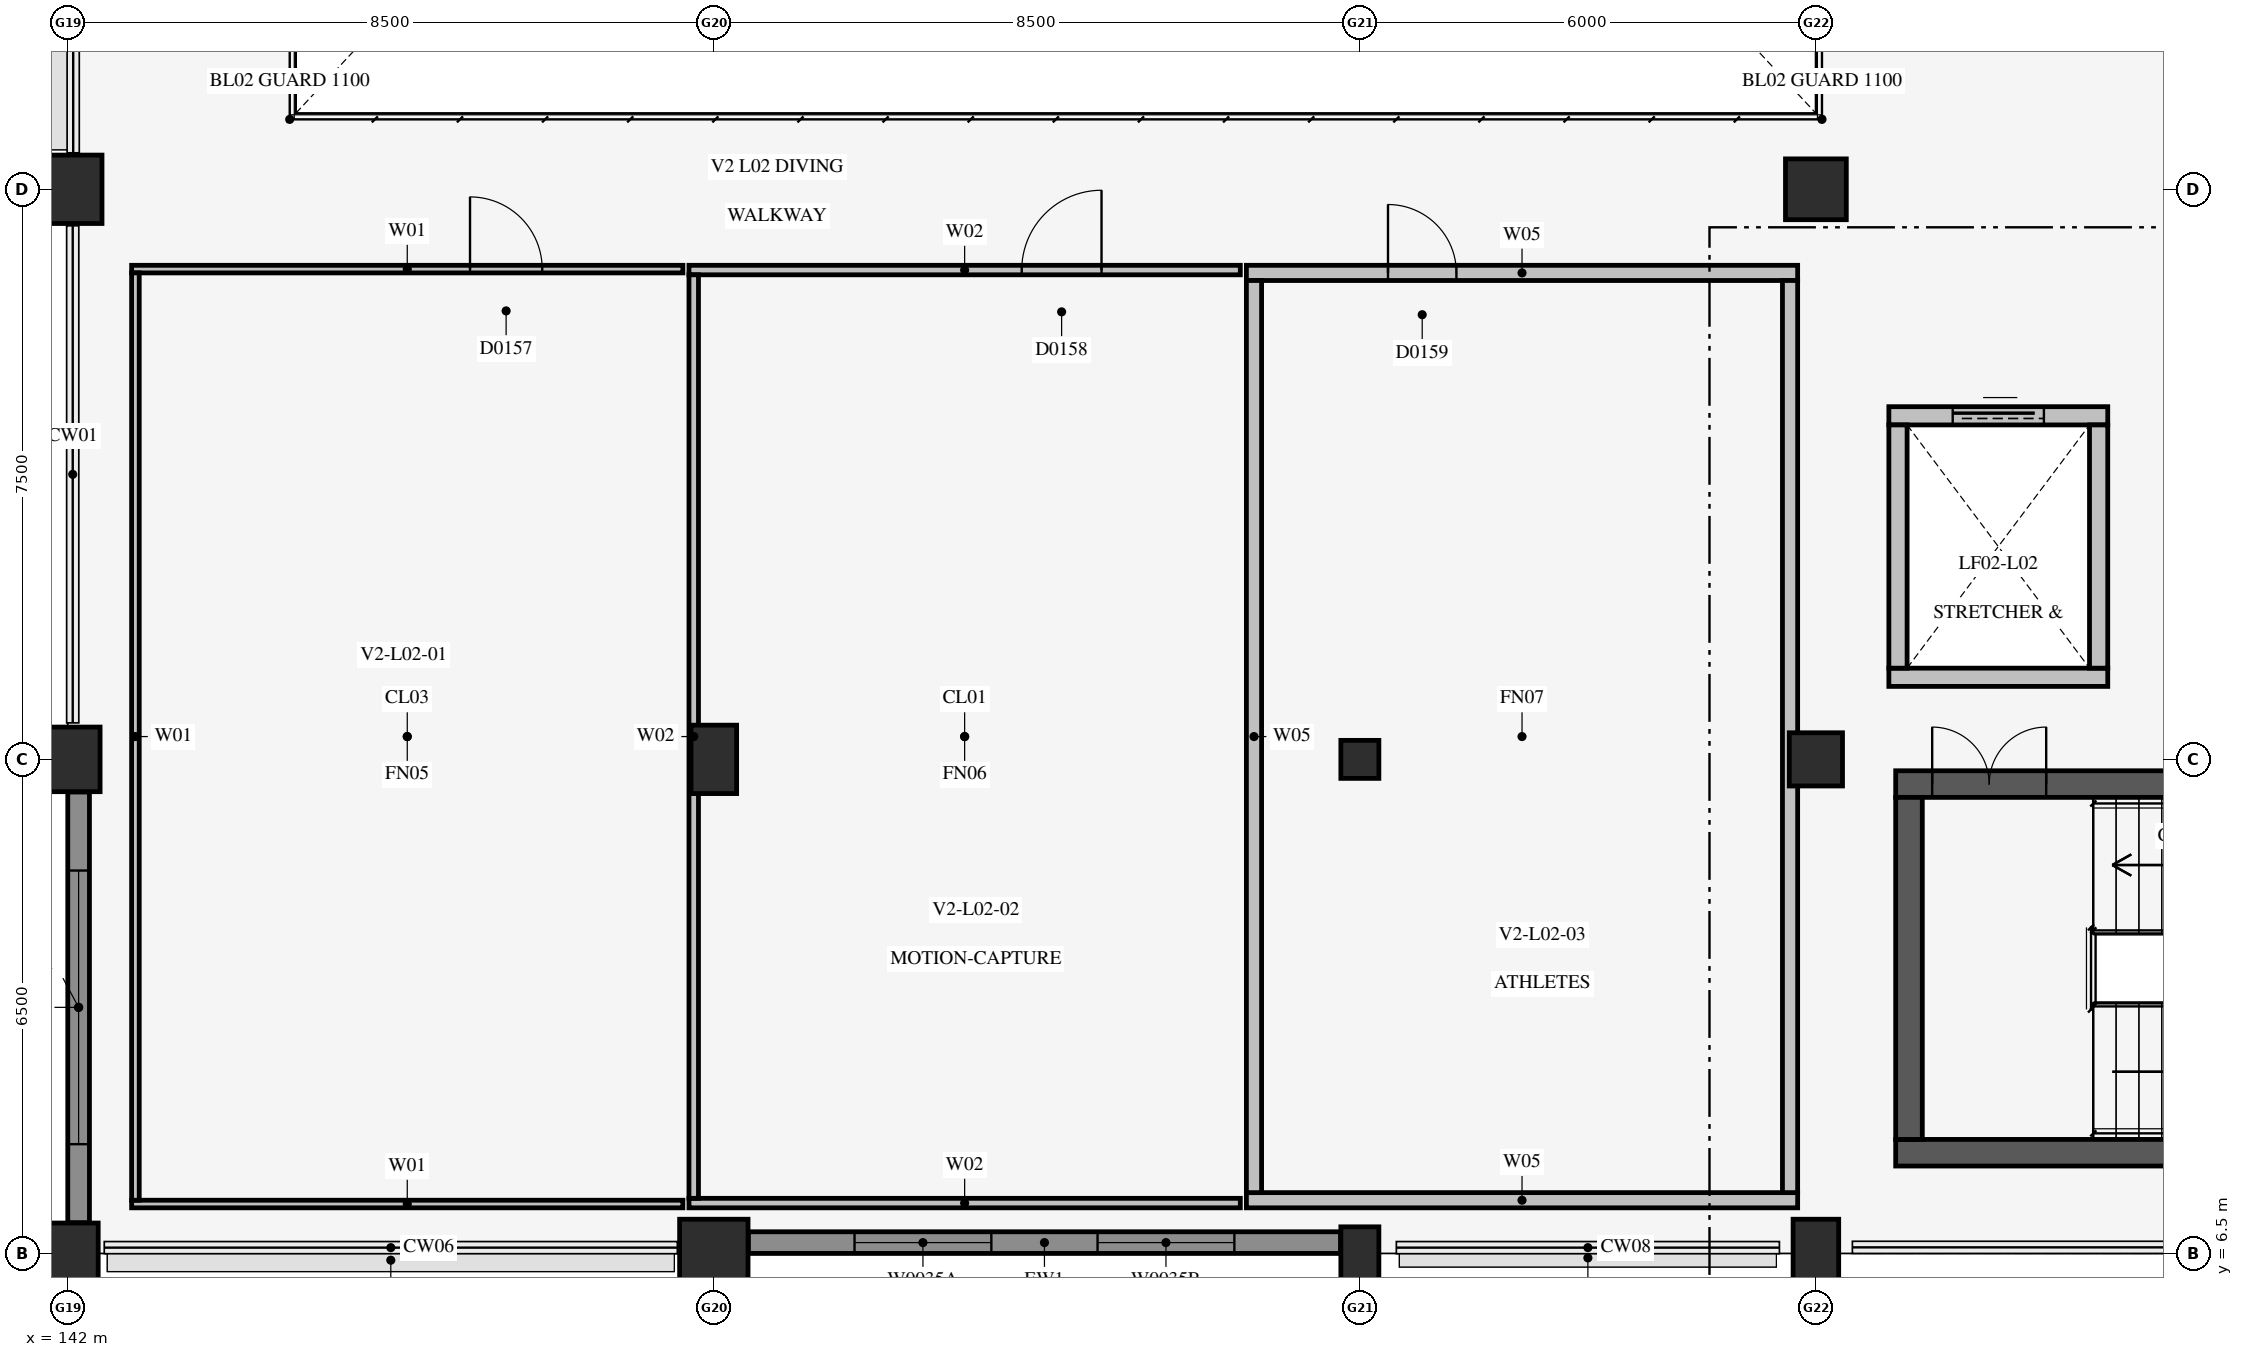
"""IFC4 building model, lengths in metres.
Left out: names, types, materials, properties, quantities, classifications, styles, units other than length and angle.
Written with IfcOpenShell. Run it as: python <this file> out.ifc"""

import sys

from ifc_helpers import new_model, si_unit, direction, frame, frame_2d, origin, origin_2d, place, context, subcontext, project, spatial, rectangle, circle, extrude, element, fill, save


model = new_model("IFC4")
c1 = context("Model", 3, precision=1e-05, world=origin(), true_north=direction((0.0, 1.0)))
c2 = subcontext(c1, "Body", "Model", "MODEL_VIEW")
j1 = project(units=[si_unit("LENGTHUNIT", "METRE"), si_unit("PLANEANGLEUNIT", "RADIAN")], contexts=[c1])
p1 = place(None, origin())
s1 = spatial("IfcSite", under=j1, at=p1, CompositionType="ELEMENT")
p2 = place(p1, origin())
s2 = spatial("IfcBuilding", under=s1, at=p2, CompositionType="ELEMENT")
p3 = place(p2, frame((0.0, 0.0, 10.2)))
s3 = spatial("IfcBuildingStorey", under=s2, at=p3, CompositionType="ELEMENT", Elevation=10.2)
p4 = place(p3, frame((166.05, 7.825, 0.0), z_axis=(0.0, 0.0, 1.0), x_axis=(1.0, 0.0, 0.0)))
e1 = element("IfcWall", 1, at=p4, inside=s3, PredefinedType="SHEAR", context=c2, shape_type="SweptSolid", body=[
    extrude(rectangle(XDim=9.5, YDim=0.35, at=frame_2d((4.75, 0.0))), origin(), (0.0, 0.0, 1.0), 4.38),
])
p5 = place(p3, frame((166.05, 12.675, 0.0), z_axis=(0.0, 0.0, 1.0), x_axis=(1.0, 0.0, 0.0)))
e2 = element("IfcWall", 2, at=p5, inside=s3, PredefinedType="SHEAR", context=c2, shape_type="SweptSolid", body=[
    extrude(rectangle(XDim=9.5, YDim=0.35, at=frame_2d((4.75, 0.0))), origin(), (0.0, 0.0, 1.0), 4.38),
])
p6 = place(p5, frame((0.48, 0.0, 0.0)))
e3 = element("IfcOpeningElement", 3, at=p6, cuts=e2, PredefinedType="OPENING", context=c2, shape_type="SweptSolid", body=[
    extrude(rectangle(XDim=1.5, YDim=2.3, at=frame_2d((0.75, 1.15))), frame((0.0, 0.187, 0.0), z_axis=(0.0, -1.0, 0.0), x_axis=(1.0, 0.0, 0.0)), (0.0, 0.0, 1.0), 0.374),
])
p7 = place(p3, frame((166.225, 8.0, 0.0), z_axis=(0.0, 0.0, 1.0), x_axis=(0.0, 1.0, 0.0)))
e4 = element("IfcWall", 4, at=p7, inside=s3, PredefinedType="SHEAR", context=c2, shape_type="SweptSolid", body=[
    extrude(rectangle(XDim=4.5, YDim=0.35, at=frame_2d((2.25, 0.0))), origin(), (0.0, 0.0, 1.0), 4.38),
])
p8 = place(p3, frame((165.96, 14.08, 0.0), z_axis=(0.0, 0.0, 1.0), x_axis=(1.0, 0.0, 0.0)))
e5 = element("IfcWall", 5, at=p8, inside=s3, PredefinedType="SOLIDWALL", context=c2, shape_type="SweptSolid", body=[
    extrude(rectangle(XDim=2.88, YDim=0.24, at=frame_2d((1.44, 0.0))), origin(), (0.0, 0.0, 1.0), 4.6),
])
p9 = place(p3, frame((165.96, 17.52, 0.0), z_axis=(0.0, 0.0, 1.0), x_axis=(1.0, 0.0, 0.0)))
e6 = element("IfcWall", 6, at=p9, inside=s3, PredefinedType="SOLIDWALL", context=c2, shape_type="SweptSolid", body=[
    extrude(rectangle(XDim=2.88, YDim=0.24, at=frame_2d((1.44, 0.0))), origin(), (0.0, 0.0, 1.0), 4.6),
])
p10 = place(p9, frame((0.84, 0.0, 0.0)))
e7 = element("IfcOpeningElement", 7, at=p10, cuts=e6, PredefinedType="OPENING", context=c2, shape_type="SweptSolid", body=[
    extrude(rectangle(XDim=1.2, YDim=2.2, at=frame_2d((0.6, 1.1))), frame((0.0, 0.132, 0.0), z_axis=(0.0, -1.0, 0.0), x_axis=(1.0, 0.0, 0.0)), (0.0, 0.0, 1.0), 0.264),
])
for number, where, z_axis, x_axis in (
    (8, (166.08, 14.2, 0.0), (0.0, 0.0, 1.0), (0.0, 1.0, 0.0)),
    (9, (168.72, 14.2, 0.0), (0.0, 0.0, 1.0), (0.0, 1.0, 0.0)),
):
    element("IfcWall", number, at=place(p3, frame(where, z_axis=z_axis, x_axis=x_axis)), inside=s3, PredefinedType="SOLIDWALL", context=c2, shape_type="SweptSolid", body=[
        extrude(rectangle(XDim=3.2, YDim=0.24, at=frame_2d((1.6, 0.0))), origin(), (0.0, 0.0, 1.0), 4.6),
    ])
p11 = place(p3, frame((142.0, 6.5, 0.0), z_axis=(0.0, 0.0, 1.0), x_axis=(1.0, 0.0, 0.0)))
e10 = element("IfcColumn", 10, at=p11, inside=s3, PredefinedType="COLUMN", context=c2, shape_type="SweptSolid", body=[
    extrude(rectangle(XDim=0.8, YDim=0.8, at=origin_2d()), origin(), (0.0, 0.0, 1.0), 4.6),
])
p12 = place(p3, frame((142.0, 13.0, 0.0), z_axis=(0.0, 0.0, 1.0), x_axis=(1.0, 0.0, 0.0)))
e11 = element("IfcColumn", 11, at=p12, inside=s3, PredefinedType="COLUMN", context=c2, shape_type="SweptSolid", body=[
    extrude(rectangle(XDim=0.85, YDim=0.85, at=origin_2d()), origin(), (0.0, 0.0, 1.0), 4.6),
])
for number, where, z_axis, x_axis in (
    (12, (142.0, 20.5, 0.0), (0.0, 0.0, 1.0), (1.0, 0.0, 0.0)),
    (13, (150.5, 6.5, 0.0), (0.0, 0.0, 1.0), (1.0, 0.0, 0.0)),
):
    element("IfcColumn", number, at=place(p3, frame(where, z_axis=z_axis, x_axis=x_axis)), inside=s3, PredefinedType="COLUMN", context=c2, shape_type="SweptSolid", body=[
        extrude(rectangle(XDim=0.9, YDim=0.9, at=origin_2d()), origin(), (0.0, 0.0, 1.0), 4.6),
    ])
p13 = place(p3, frame((150.5, 13.0, 0.0), z_axis=(0.0, 0.0, 1.0), x_axis=(1.0, 0.0, 0.0)))
e14 = element("IfcColumn", 14, at=p13, inside=s3, PredefinedType="COLUMN", context=c2, shape_type="SweptSolid", body=[
    extrude(rectangle(XDim=0.6, YDim=0.9, at=origin_2d()), origin(), (0.0, 0.0, 1.0), 4.6),
])
p14 = place(p3, frame((159.0, 6.5, 0.0), z_axis=(0.0, 0.0, 1.0), x_axis=(1.0, 0.0, 0.0)))
e15 = element("IfcColumn", 15, at=p14, inside=s3, PredefinedType="COLUMN", context=c2, shape_type="SweptSolid", body=[
    extrude(rectangle(XDim=0.5, YDim=0.7, at=origin_2d()), origin(), (0.0, 0.0, 1.0), 4.6),
])
p15 = place(p3, frame((159.0, 13.0, 0.0), z_axis=(0.0, 0.0, 1.0), x_axis=(1.0, 0.0, 0.0)))
e16 = element("IfcColumn", 16, at=p15, inside=s3, PredefinedType="COLUMN", context=c2, shape_type="SweptSolid", body=[
    extrude(circle(Radius=0.25, at=origin_2d()), origin(), (0.0, 0.0, 1.0), 4.6),
])
p16 = place(p3, frame((165.0, 6.5, 0.0), z_axis=(0.0, 0.0, 1.0), x_axis=(1.0, 0.0, 0.0)))
e17 = element("IfcColumn", 17, at=p16, inside=s3, PredefinedType="COLUMN", context=c2, shape_type="SweptSolid", body=[
    extrude(rectangle(XDim=0.6, YDim=0.9, at=origin_2d()), origin(), (0.0, 0.0, 1.0), 4.6),
])
p17 = place(p3, frame((165.0, 13.0, 0.0), z_axis=(0.0, 0.0, 1.0), x_axis=(1.0, 0.0, 0.0)))
e18 = element("IfcColumn", 18, at=p17, inside=s3, PredefinedType="COLUMN", context=c2, shape_type="SweptSolid", body=[
    extrude(circle(Radius=0.35, at=origin_2d()), origin(), (0.0, 0.0, 1.0), 4.6),
])
p18 = place(p3, frame((165.0, 20.5, 0.0), z_axis=(0.0, 0.0, 1.0), x_axis=(1.0, 0.0, 0.0)))
e19 = element("IfcColumn", 19, at=p18, inside=s3, PredefinedType="COLUMN", context=c2, shape_type="SweptSolid", body=[
    extrude(circle(Radius=0.4, at=origin_2d()), origin(), (0.0, 0.0, 1.0), 4.6),
])
p19 = place(p3, frame((142.84, 7.15, 0.0), z_axis=(0.0, 0.0, 1.0), x_axis=(1.0, 0.0, 0.0)))
e20 = element("IfcWall", 20, at=p19, inside=s3, PredefinedType="PARTITIONING", context=c2, shape_type="SweptSolid", body=[
    extrude(rectangle(XDim=7.253, YDim=0.1, at=frame_2d((3.626, 0.0))), origin(), (0.0, 0.0, 1.0), 4.365),
])
p20 = place(p3, frame((142.84, 19.45, 0.0), z_axis=(0.0, 0.0, 1.0), x_axis=(1.0, 0.0, 0.0)))
e21 = element("IfcWall", 21, at=p20, inside=s3, PredefinedType="PARTITIONING", context=c2, shape_type="SweptSolid", body=[
    extrude(rectangle(XDim=7.253, YDim=0.1, at=frame_2d((3.626, 0.0))), origin(), (0.0, 0.0, 1.0), 4.365),
])
p21 = place(p20, frame((4.452, 0.0, 0.0)))
e22 = element("IfcOpeningElement", 22, at=p21, cuts=e21, PredefinedType="OPENING", context=c2, shape_type="SweptSolid", body=[
    extrude(rectangle(XDim=0.95, YDim=2.15, at=frame_2d((0.475, 1.075))), frame((0.0, 0.062, 0.0), z_axis=(0.0, -1.0, 0.0), x_axis=(1.0, 0.0, 0.0)), (0.0, 0.0, 1.0), 0.124),
])
p22 = place(p3, frame((142.89, 7.2, 0.0), z_axis=(0.0, 0.0, 1.0), x_axis=(0.0, 1.0, 0.0)))
e23 = element("IfcWall", 23, at=p22, inside=s3, PredefinedType="PARTITIONING", context=c2, shape_type="SweptSolid", body=[
    extrude(rectangle(XDim=12.2, YDim=0.1, at=frame_2d((6.1, 0.0))), origin(), (0.0, 0.0, 1.0), 4.365),
])
p23 = place(p3, frame((150.173, 7.163, 0.0), z_axis=(0.0, 0.0, 1.0), x_axis=(1.0, 0.0, 0.0)))
e24 = element("IfcWall", 24, at=p23, inside=s3, PredefinedType="PARTITIONING", context=c2, shape_type="SweptSolid", body=[
    extrude(rectangle(XDim=7.254, YDim=0.125, at=frame_2d((3.627, 0.0))), origin(), (0.0, 0.0, 1.0), 4.365),
])
p24 = place(p3, frame((150.173, 19.438, 0.0), z_axis=(0.0, 0.0, 1.0), x_axis=(1.0, 0.0, 0.0)))
e25 = element("IfcWall", 25, at=p24, inside=s3, PredefinedType="PARTITIONING", context=c2, shape_type="SweptSolid", body=[
    extrude(rectangle(XDim=7.254, YDim=0.125, at=frame_2d((3.627, 0.0))), origin(), (0.0, 0.0, 1.0), 4.365),
])
p25 = place(p24, frame((4.378, 0.0, 0.0)))
e26 = element("IfcOpeningElement", 26, at=p25, cuts=e25, PredefinedType="OPENING", context=c2, shape_type="SweptSolid", body=[
    extrude(rectangle(XDim=1.05, YDim=2.15, at=frame_2d((0.525, 1.075))), frame((0.0, 0.074, 0.0), z_axis=(0.0, -1.0, 0.0), x_axis=(1.0, 0.0, 0.0)), (0.0, 0.0, 1.0), 0.149),
])
p26 = place(p3, frame((150.236, 7.225, 0.0), z_axis=(0.0, 0.0, 1.0), x_axis=(0.0, 1.0, 0.0)))
e27 = element("IfcWall", 27, at=p26, inside=s3, PredefinedType="PARTITIONING", context=c2, shape_type="SweptSolid", body=[
    extrude(rectangle(XDim=12.15, YDim=0.125, at=frame_2d((6.075, 0.0))), origin(), (0.0, 0.0, 1.0), 4.365),
])
p27 = place(p3, frame((157.507, 7.2, 0.0), z_axis=(0.0, 0.0, 1.0), x_axis=(1.0, 0.0, 0.0)))
e28 = element("IfcWall", 28, at=p27, inside=s3, PredefinedType="PLUMBINGWALL", context=c2, shape_type="SweptSolid", body=[
    extrude(rectangle(XDim=7.253, YDim=0.2, at=frame_2d((3.626, 0.0))), origin(), (0.0, 0.0, 1.0), 4.365),
])
p28 = place(p3, frame((157.507, 19.4, 0.0), z_axis=(0.0, 0.0, 1.0), x_axis=(1.0, 0.0, 0.0)))
e29 = element("IfcWall", 29, at=p28, inside=s3, PredefinedType="PLUMBINGWALL", context=c2, shape_type="SweptSolid", body=[
    extrude(rectangle(XDim=7.253, YDim=0.2, at=frame_2d((3.626, 0.0))), origin(), (0.0, 0.0, 1.0), 4.365),
])
p29 = place(p28, frame((1.863, 0.0, 0.0)))
e30 = element("IfcOpeningElement", 30, at=p29, cuts=e29, PredefinedType="OPENING", context=c2, shape_type="SweptSolid", body=[
    extrude(rectangle(XDim=0.9, YDim=2.1, at=frame_2d((0.45, 1.05))), frame((0.0, 0.112, 0.0), z_axis=(0.0, -1.0, 0.0), x_axis=(1.0, 0.0, 0.0)), (0.0, 0.0, 1.0), 0.224),
])
for number, where, z_axis, x_axis in (
    (31, (164.66, 7.3, 0.0), (0.0, 0.0, 1.0), (0.0, 1.0, 0.0)),
    (32, (157.607, 7.3, 0.0), (0.0, 0.0, 1.0), (0.0, 1.0, 0.0)),
):
    element("IfcWall", number, at=place(p3, frame(where, z_axis=z_axis, x_axis=x_axis)), inside=s3, PredefinedType="PLUMBINGWALL", context=c2, shape_type="SweptSolid", body=[
        extrude(rectangle(XDim=12.0, YDim=0.2, at=frame_2d((6.0, 0.0))), origin(), (0.0, 0.0, 1.0), 4.365),
    ])
p30 = place(p3, frame((150.954, 6.643, 0.0), z_axis=(0.0, 0.0, 1.0), x_axis=(1.0, 0.0, 0.0)))
e33 = element("IfcWall", 33, at=p30, inside=s3, PredefinedType="SOLIDWALL", context=c2, shape_type="SweptSolid", body=[
    extrude(rectangle(XDim=7.792, YDim=0.285, at=frame_2d((3.896, 0.0))), origin(), (0.0, 0.0, 1.0), 3.814),
])
p31 = place(p30, frame((1.397, 0.0, 0.95)))
e34 = element("IfcOpeningElement", 34, at=p31, cuts=e33, PredefinedType="OPENING", context=c2, shape_type="SweptSolid", body=[
    extrude(rectangle(XDim=1.8, YDim=1.8, at=frame_2d((0.9, 0.9))), frame((0.0, 0.154, 0.0), z_axis=(0.0, -1.0, 0.0), x_axis=(1.0, 0.0, 0.0)), (0.0, 0.0, 1.0), 0.309),
])
p32 = place(p30, frame((4.595, 0.0, 0.95)))
e35 = element("IfcOpeningElement", 35, at=p32, cuts=e33, PredefinedType="OPENING", context=c2, shape_type="SweptSolid", body=[
    extrude(rectangle(XDim=1.8, YDim=1.8, at=frame_2d((0.9, 0.9))), frame((0.0, 0.154, 0.0), z_axis=(0.0, -1.0, 0.0), x_axis=(1.0, 0.0, 0.0)), (0.0, 0.0, 1.0), 0.309),
])
p33 = place(p3, frame((142.143, 6.904, 0.0), z_axis=(0.0, 0.0, 1.0), x_axis=(0.0, 1.0, 0.0)))
e36 = element("IfcWall", 36, at=p33, inside=s3, PredefinedType="SOLIDWALL", context=c2, shape_type="SweptSolid", body=[
    extrude(rectangle(XDim=5.667, YDim=0.285, at=frame_2d((2.833, 0.0))), origin(), (0.0, 0.0, 1.0), 3.814),
])
p34 = place(p33, frame((1.033, 0.0, 0.95)))
e37 = element("IfcOpeningElement", 37, at=p34, cuts=e36, PredefinedType="OPENING", context=c2, shape_type="SweptSolid", body=[
    extrude(rectangle(XDim=3.6, YDim=1.8, at=frame_2d((1.8, 0.9))), frame((0.0, 0.154, 0.0), z_axis=(0.0, -1.0, 0.0), x_axis=(1.0, 0.0, 0.0)), (0.0, 0.0, 1.0), 0.309),
])
p35 = place(p6, frame((1.5, 0.0, 0.0), z_axis=(0.0, 0.0, 1.0), x_axis=(-1.0, 0.0, 0.0)))
e38 = element("IfcDoor", 38, at=p35, inside=s3, OperationType="DOUBLE_DOOR_SINGLE_SWING", PredefinedType="DOOR", context=c2, shape_type="SweptSolid", body=[
    extrude(rectangle(XDim=1.5, YDim=2.3, at=frame_2d((0.75, 1.15))), frame((0.0, 0.025, 0.0), z_axis=(0.0, -1.0, 0.0), x_axis=(1.0, 0.0, 0.0)), (0.0, 0.0, 1.0), 0.05),
])
fill(e3, e38)
p36 = place(p21, frame((0.95, 0.0, 0.0), z_axis=(0.0, 0.0, 1.0), x_axis=(-1.0, 0.0, 0.0)))
e39 = element("IfcDoor", 39, at=p36, inside=s3, OperationType="SINGLE_SWING_LEFT", PredefinedType="DOOR", context=c2, shape_type="SweptSolid", body=[
    extrude(rectangle(XDim=0.95, YDim=2.15, at=frame_2d((0.475, 1.075))), frame((0.0, 0.025, 0.0), z_axis=(0.0, -1.0, 0.0), x_axis=(1.0, 0.0, 0.0)), (0.0, 0.0, 1.0), 0.05),
])
fill(e22, e39)
p37 = place(p25, frame((1.05, 0.0, 0.0), z_axis=(0.0, 0.0, 1.0), x_axis=(-1.0, 0.0, 0.0)))
e40 = element("IfcDoor", 40, at=p37, inside=s3, OperationType="SINGLE_SWING_RIGHT", PredefinedType="DOOR", context=c2, shape_type="SweptSolid", body=[
    extrude(rectangle(XDim=1.05, YDim=2.15, at=frame_2d((0.525, 1.075))), frame((0.0, 0.025, 0.0), z_axis=(0.0, -1.0, 0.0), x_axis=(1.0, 0.0, 0.0)), (0.0, 0.0, 1.0), 0.05),
])
fill(e26, e40)
p38 = place(p29, frame((0.9, 0.0, 0.0), z_axis=(0.0, 0.0, 1.0), x_axis=(-1.0, 0.0, 0.0)))
e41 = element("IfcDoor", 41, at=p38, inside=s3, OperationType="SINGLE_SWING_LEFT", PredefinedType="DOOR", context=c2, shape_type="SweptSolid", body=[
    extrude(rectangle(XDim=0.9, YDim=2.1, at=frame_2d((0.45, 1.05))), frame((0.0, 0.025, 0.0), z_axis=(0.0, -1.0, 0.0), x_axis=(1.0, 0.0, 0.0)), (0.0, 0.0, 1.0), 0.05),
])
fill(e30, e41)
p39 = place(p31, origin())
e42 = element("IfcWindow", 42, at=p39, inside=s3, PartitioningType="SINGLE_PANEL", PredefinedType="WINDOW", context=c2, shape_type="SweptSolid", body=[
    extrude(rectangle(XDim=1.8, YDim=1.8, at=frame_2d((0.9, 0.9))), frame((0.0, 0.03, 0.0), z_axis=(0.0, -1.0, 0.0), x_axis=(1.0, 0.0, 0.0)), (0.0, 0.0, 1.0), 0.06),
])
fill(e34, e42)
p40 = place(p32, origin())
e43 = element("IfcWindow", 43, at=p40, inside=s3, PartitioningType="SINGLE_PANEL", PredefinedType="WINDOW", context=c2, shape_type="SweptSolid", body=[
    extrude(rectangle(XDim=1.8, YDim=1.8, at=frame_2d((0.9, 0.9))), frame((0.0, 0.03, 0.0), z_axis=(0.0, -1.0, 0.0), x_axis=(1.0, 0.0, 0.0)), (0.0, 0.0, 1.0), 0.06),
])
fill(e35, e43)
p41 = place(p34, origin())
e44 = element("IfcWindow", 44, at=p41, inside=s3, PartitioningType="SINGLE_PANEL", PredefinedType="WINDOW", context=c2, shape_type="SweptSolid", body=[
    extrude(rectangle(XDim=3.6, YDim=1.8, at=frame_2d((1.8, 0.9))), frame((0.0, 0.03, 0.0), z_axis=(0.0, -1.0, 0.0), x_axis=(1.0, 0.0, 0.0)), (0.0, 0.0, 1.0), 0.06),
])
fill(e37, e44)
p42 = place(p10, origin())
e45 = element("IfcDoor", 45, at=p42, inside=s3, OperationType="SLIDING_TO_RIGHT", PredefinedType="USERDEFINED", context=c2, shape_type="SweptSolid", body=[
    extrude(rectangle(XDim=1.2, YDim=2.2, at=frame_2d((0.6, 1.1))), frame((0.0, 0.025, 0.0), z_axis=(0.0, -1.0, 0.0), x_axis=(1.0, 0.0, 0.0)), (0.0, 0.0, 1.0), 0.05),
])
fill(e7, e45)
save(model, sys.argv[1])
